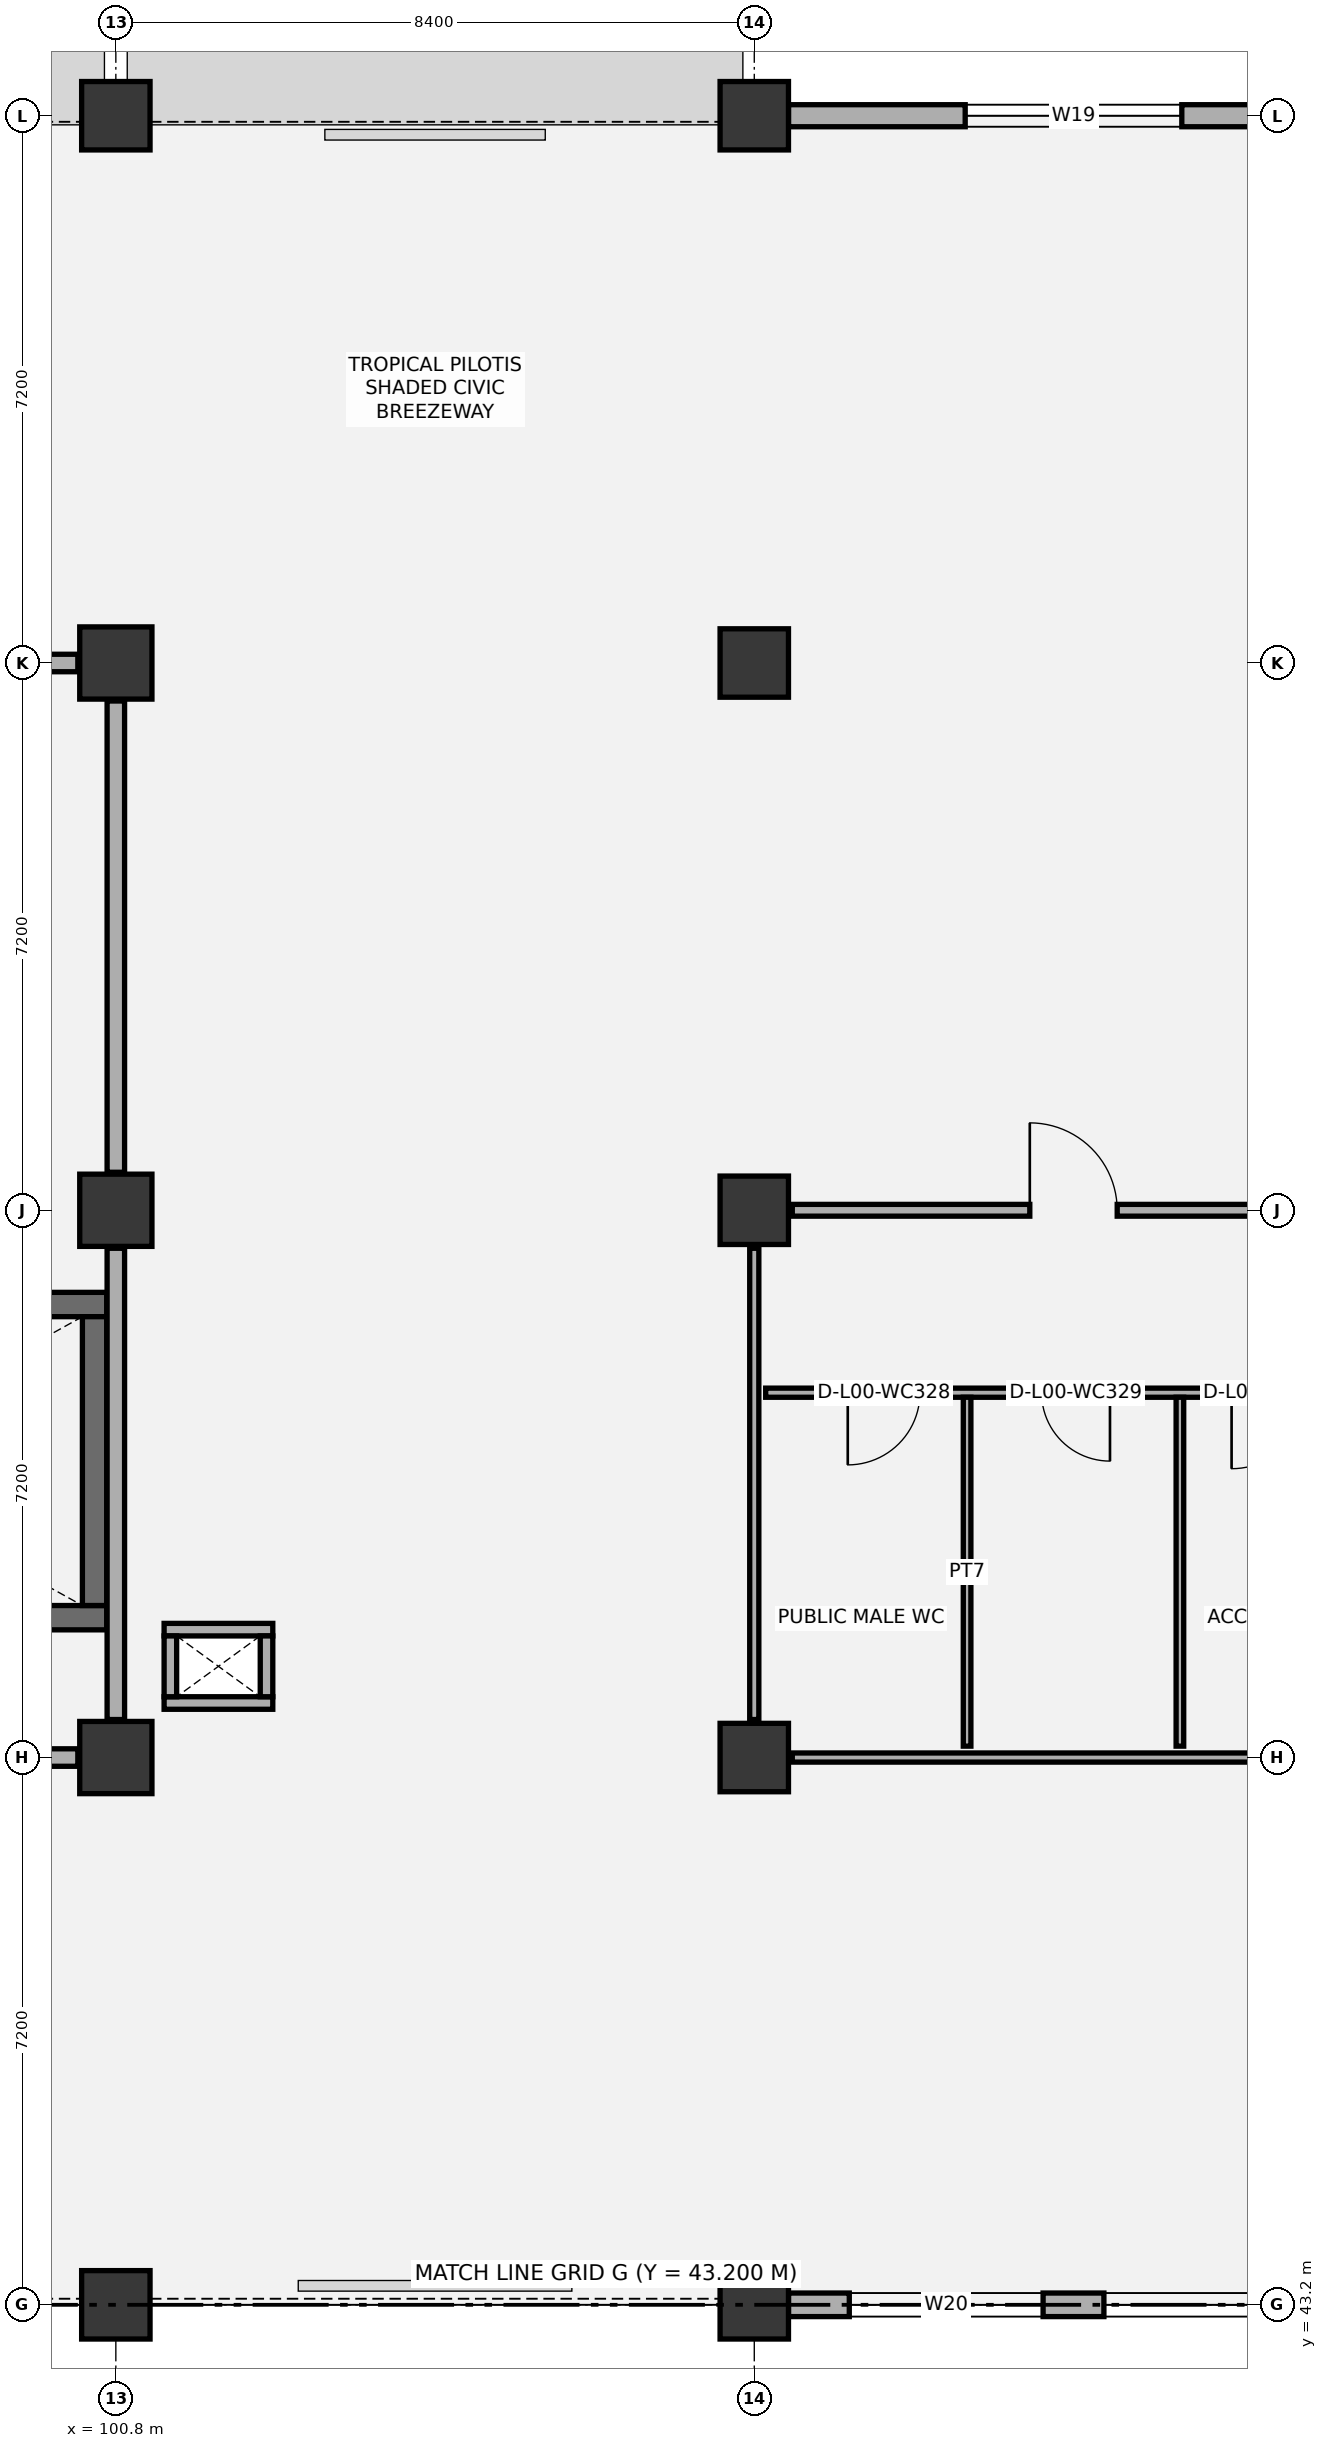
"""IFC4 building model, lengths in metres.
Left out: names, types, materials, properties, quantities, classifications, styles, units other than length and angle.
Written with IfcOpenShell. Run it as: python <this file> out.ifc"""

import sys

from ifc_helpers import new_model, si_unit, direction, frame, frame_2d, origin, origin_2d, place, context, subcontext, project, spatial, rectangle, circle, extrude, element, fill, save


model = new_model("IFC4")
c1 = context("Model", 3, precision=1e-05, world=origin(), true_north=direction((0.0, 1.0)))
c2 = subcontext(c1, "Body", "Model", "MODEL_VIEW")
j1 = project(units=[si_unit("LENGTHUNIT", "METRE"), si_unit("PLANEANGLEUNIT", "RADIAN")], contexts=[c1])
p1 = place(None, origin())
s1 = spatial("IfcSite", under=j1, at=p1, CompositionType="ELEMENT")
p2 = place(p1, origin())
s2 = spatial("IfcBuilding", under=s1, at=p2, CompositionType="ELEMENT")
p3 = place(p2, origin())
s3 = spatial("IfcBuildingStorey", under=s2, at=p3, CompositionType="ELEMENT", Elevation=0.0)
p4 = place(p3, frame((100.8, 43.2, 0.0), z_axis=(0.0, 0.0, 1.0), x_axis=(1.0, 0.0, 0.0)))
e1 = element("IfcColumn", 1, at=p4, inside=s3, PredefinedType="COLUMN", context=c2, shape_type="SweptSolid", body=[
    extrude(circle(Radius=0.45, at=origin_2d()), origin(), (0.0, 0.0, 1.0), 6.0),
])
for number, where, z_axis, x_axis in (
    (2, (100.8, 50.4, 0.0), (0.0, 0.0, 1.0), (1.0, 0.0, 0.0)),
    (3, (100.8, 57.6, 0.0), (0.0, 0.0, 1.0), (1.0, 0.0, 0.0)),
    (4, (100.8, 64.8, 0.0), (0.0, 0.0, 1.0), (1.0, 0.0, 0.0)),
):
    element("IfcColumn", number, at=place(p3, frame(where, z_axis=z_axis, x_axis=x_axis)), inside=s3, PredefinedType="COLUMN", context=c2, shape_type="SweptSolid", body=[
        extrude(rectangle(XDim=0.95, YDim=0.95, at=origin_2d()), origin(), (0.0, 0.0, 1.0), 6.0),
    ])
for number, where, z_axis, x_axis in (
    (5, (100.8, 72.0, 0.0), (0.0, 0.0, 1.0), (1.0, 0.0, 0.0)),
    (6, (109.2, 43.2, 0.0), (0.0, 0.0, 1.0), (1.0, 0.0, 0.0)),
):
    element("IfcColumn", number, at=place(p3, frame(where, z_axis=z_axis, x_axis=x_axis)), inside=s3, PredefinedType="COLUMN", context=c2, shape_type="SweptSolid", body=[
        extrude(circle(Radius=0.45, at=origin_2d()), origin(), (0.0, 0.0, 1.0), 6.0),
    ])
for number, where, z_axis, x_axis in (
    (7, (109.2, 50.4, 0.0), (0.0, 0.0, 1.0), (1.0, 0.0, 0.0)),
    (8, (109.2, 57.6, 0.0), (0.0, 0.0, 1.0), (1.0, 0.0, 0.0)),
    (9, (109.2, 64.8, 0.0), (0.0, 0.0, 1.0), (1.0, 0.0, 0.0)),
):
    element("IfcColumn", number, at=place(p3, frame(where, z_axis=z_axis, x_axis=x_axis)), inside=s3, PredefinedType="COLUMN", context=c2, shape_type="SweptSolid", body=[
        extrude(rectangle(XDim=0.9, YDim=0.9, at=origin_2d()), origin(), (0.0, 0.0, 1.0), 6.0),
    ])
p5 = place(p3, frame((109.2, 72.0, 0.0), z_axis=(0.0, 0.0, 1.0), x_axis=(1.0, 0.0, 0.0)))
e10 = element("IfcColumn", 10, at=p5, inside=s3, PredefinedType="COLUMN", context=c2, shape_type="SweptSolid", body=[
    extrude(circle(Radius=0.45, at=origin_2d()), origin(), (0.0, 0.0, 1.0), 6.0),
])
p6 = place(p3, frame((93.2, 52.24, 0.0), z_axis=(0.0, 0.0, 1.0), x_axis=(1.0, 0.0, 0.0)))
e11 = element("IfcWall", 11, at=p6, inside=s3, PredefinedType="SHEAR", context=c2, shape_type="SweptSolid", body=[
    extrude(rectangle(XDim=7.48, YDim=0.32, at=frame_2d((3.74, 0.0))), origin(), (0.0, 0.0, 1.0), 5.675),
])
p7 = place(p6, frame((0.45, 0.0, 0.0)))
e12 = element("IfcOpeningElement", 12, at=p7, cuts=e11, PredefinedType="OPENING", context=c2, shape_type="SweptSolid", body=[
    extrude(rectangle(XDim=1.05, YDim=2.15, at=frame_2d((0.525, 1.075))), frame((0.0, 0.17, 0.0), z_axis=(0.0, -1.0, 0.0), x_axis=(1.0, 0.0, 0.0)), (0.0, 0.0, 1.0), 0.34),
])
p8 = place(p3, frame((93.2, 56.36, 0.0), z_axis=(0.0, 0.0, 1.0), x_axis=(1.0, 0.0, 0.0)))
e13 = element("IfcWall", 13, at=p8, inside=s3, PredefinedType="SHEAR", context=c2, shape_type="SweptSolid", body=[
    extrude(rectangle(XDim=7.48, YDim=0.32, at=frame_2d((3.74, 0.0))), origin(), (0.0, 0.0, 1.0), 5.675),
])
p9 = place(p3, frame((100.52, 52.4, 0.0), z_axis=(0.0, 0.0, 1.0), x_axis=(0.0, 1.0, 0.0)))
e14 = element("IfcWall", 14, at=p9, inside=s3, PredefinedType="SHEAR", context=c2, shape_type="SweptSolid", body=[
    extrude(rectangle(XDim=3.8, YDim=0.32, at=frame_2d((1.9, 0.0))), origin(), (0.0, 0.0, 1.0), 5.675),
])
p10 = place(p3, frame((109.65, 43.2, 0.0), z_axis=(0.0, 0.0, 1.0), x_axis=(1.0, 0.0, 0.0)))
e15 = element("IfcWall", 15, at=p10, inside=s3, PredefinedType="SOLIDWALL", context=c2, shape_type="SweptSolid", body=[
    extrude(rectangle(XDim=7.5, YDim=0.31, at=frame_2d((3.75, 0.0))), origin(), (0.0, 0.0, 1.0), 5.02),
])
p11 = place(p10, frame((0.8, 0.0, 0.9)))
e16 = element("IfcOpeningElement", 16, at=p11, cuts=e15, PredefinedType="OPENING", context=c2, shape_type="SweptSolid", body=[
    extrude(rectangle(XDim=2.55, YDim=1.95, at=frame_2d((1.275, 0.975))), frame((0.0, 0.165, 0.0), z_axis=(0.0, -1.0, 0.0), x_axis=(1.0, 0.0, 0.0)), (0.0, 0.0, 1.0), 0.33),
])
p12 = place(p10, frame((4.15, 0.0, 0.9)))
e17 = element("IfcOpeningElement", 17, at=p12, cuts=e15, PredefinedType="OPENING", context=c2, shape_type="SweptSolid", body=[
    extrude(rectangle(XDim=2.55, YDim=1.95, at=frame_2d((1.275, 0.975))), frame((0.0, 0.165, 0.0), z_axis=(0.0, -1.0, 0.0), x_axis=(1.0, 0.0, 0.0)), (0.0, 0.0, 1.0), 0.33),
])
p13 = place(p3, frame((109.65, 72.0, 0.0), z_axis=(0.0, 0.0, 1.0), x_axis=(1.0, 0.0, 0.0)))
e18 = element("IfcWall", 18, at=p13, inside=s3, PredefinedType="SOLIDWALL", context=c2, shape_type="SweptSolid", body=[
    extrude(rectangle(XDim=7.5, YDim=0.29, at=frame_2d((3.75, 0.0))), origin(), (0.0, 0.0, 1.0), 5.02),
])
p14 = place(p13, frame((2.325, 0.0, 0.9)))
e19 = element("IfcOpeningElement", 19, at=p14, cuts=e18, PredefinedType="OPENING", context=c2, shape_type="SweptSolid", body=[
    extrude(rectangle(XDim=2.85, YDim=1.95, at=frame_2d((1.425, 0.975))), frame((0.0, 0.155, 0.0), z_axis=(0.0, -1.0, 0.0), x_axis=(1.0, 0.0, 0.0)), (0.0, 0.0, 1.0), 0.31),
])
for number, where, z_axis, x_axis in (
    (20, (101.435, 51.117, 0.0), (0.0, 0.0, 1.0), (1.0, 0.0, 0.0)),
    (21, (101.435, 52.083, 0.0), (0.0, 0.0, 1.0), (1.0, 0.0, 0.0)),
):
    element("IfcWall", number, at=place(p3, frame(where, z_axis=z_axis, x_axis=x_axis)), inside=s3, PredefinedType="PARTITIONING", context=c2, shape_type="SweptSolid", body=[
        extrude(rectangle(XDim=1.43, YDim=0.165, at=frame_2d((0.715, 0.0))), origin(), (0.0, 0.0, 1.0), 5.675),
    ])
for number, where, z_axis, x_axis in (
    (22, (101.518, 51.2, 0.0), (0.0, 0.0, 1.0), (0.0, 1.0, 0.0)),
    (23, (102.782, 51.2, 0.0), (0.0, 0.0, 1.0), (0.0, 1.0, 0.0)),
):
    element("IfcWall", number, at=place(p3, frame(where, z_axis=z_axis, x_axis=x_axis)), inside=s3, PredefinedType="PARTITIONING", context=c2, shape_type="SweptSolid", body=[
        extrude(rectangle(XDim=0.8, YDim=0.165, at=frame_2d((0.4, 0.0))), origin(), (0.0, 0.0, 1.0), 5.675),
    ])
p15 = place(p3, frame((109.35, 55.2, 0.0), z_axis=(0.0, 0.0, 1.0), x_axis=(1.0, 0.0, 0.0)))
e24 = element("IfcWall", 24, at=p15, inside=s3, PredefinedType="PARTITIONING", context=c2, shape_type="SweptSolid", body=[
    extrude(rectangle(XDim=8.1, YDim=0.12, at=frame_2d((4.05, 0.0))), origin(), (0.0, 0.0, 1.0), 5.675),
])
p16 = place(p15, frame((1.08, 0.0, 0.0)))
e25 = element("IfcOpeningElement", 25, at=p16, cuts=e24, PredefinedType="OPENING", context=c2, shape_type="SweptSolid", body=[
    extrude(rectangle(XDim=0.95, YDim=2.1, at=frame_2d((0.475, 1.05))), frame((0.0, 0.07, 0.0), z_axis=(0.0, -1.0, 0.0), x_axis=(1.0, 0.0, 0.0)), (0.0, 0.0, 1.0), 0.14),
])
p17 = place(p15, frame((3.63, 0.0, 0.0)))
e26 = element("IfcOpeningElement", 26, at=p17, cuts=e24, PredefinedType="OPENING", context=c2, shape_type="SweptSolid", body=[
    extrude(rectangle(XDim=0.9, YDim=2.1, at=frame_2d((0.45, 1.05))), frame((0.0, 0.07, 0.0), z_axis=(0.0, -1.0, 0.0), x_axis=(1.0, 0.0, 0.0)), (0.0, 0.0, 1.0), 0.14),
])
p18 = place(p15, frame((6.13, 0.0, 0.0)))
e27 = element("IfcOpeningElement", 27, at=p18, cuts=e24, PredefinedType="OPENING", context=c2, shape_type="SweptSolid", body=[
    extrude(rectangle(XDim=1.0, YDim=2.1, at=frame_2d((0.5, 1.05))), frame((0.0, 0.07, 0.0), z_axis=(0.0, -1.0, 0.0), x_axis=(1.0, 0.0, 0.0)), (0.0, 0.0, 1.0), 0.14),
])
for number, where, z_axis, x_axis in (
    (28, (112.0, 50.55, 0.0), (0.0, 0.0, 1.0), (0.0, 1.0, 0.0)),
    (29, (114.8, 50.55, 0.0), (0.0, 0.0, 1.0), (0.0, 1.0, 0.0)),
):
    element("IfcWall", number, at=place(p3, frame(where, z_axis=z_axis, x_axis=x_axis)), inside=s3, PredefinedType="PARTITIONING", context=c2, shape_type="SweptSolid", body=[
        extrude(rectangle(XDim=4.59, YDim=0.1, at=frame_2d((2.295, 0.0))), origin(), (0.0, 0.0, 1.0), 5.675),
    ])
p19 = place(p3, frame((92.9, 50.4, 0.0), z_axis=(0.0, 0.0, 1.0), x_axis=(1.0, 0.0, 0.0)))
e30 = element("IfcWall", 30, at=p19, inside=s3, PredefinedType="PARTITIONING", context=c2, shape_type="SweptSolid", body=[
    extrude(rectangle(XDim=7.4, YDim=0.23, at=frame_2d((3.7, 0.0))), origin(), (0.0, 0.0, 1.0), 4.87),
])
p20 = place(p19, frame((2.95, 0.0, 0.0)))
e31 = element("IfcOpeningElement", 31, at=p20, cuts=e30, PredefinedType="OPENING", context=c2, shape_type="SweptSolid", body=[
    extrude(rectangle(XDim=1.5, YDim=2.15, at=frame_2d((0.75, 1.075))), frame((0.0, 0.125, 0.0), z_axis=(0.0, -1.0, 0.0), x_axis=(1.0, 0.0, 0.0)), (0.0, 0.0, 1.0), 0.25),
])
p21 = place(p3, frame((100.8, 50.9, 0.0), z_axis=(0.0, 0.0, 1.0), x_axis=(0.0, 1.0, 0.0)))
e32 = element("IfcWall", 32, at=p21, inside=s3, PredefinedType="PARTITIONING", context=c2, shape_type="SweptSolid", body=[
    extrude(rectangle(XDim=6.2, YDim=0.23, at=frame_2d((3.1, 0.0))), origin(), (0.0, 0.0, 1.0), 4.92),
])
p22 = place(p3, frame((100.8, 58.1, 0.0), z_axis=(0.0, 0.0, 1.0), x_axis=(0.0, 1.0, 0.0)))
e33 = element("IfcWall", 33, at=p22, inside=s3, PredefinedType="PARTITIONING", context=c2, shape_type="SweptSolid", body=[
    extrude(rectangle(XDim=6.2, YDim=0.23, at=frame_2d((3.1, 0.0))), origin(), (0.0, 0.0, 1.0), 5.38),
])
p23 = place(p3, frame((92.9, 64.8, 0.0), z_axis=(0.0, 0.0, 1.0), x_axis=(1.0, 0.0, 0.0)))
e34 = element("IfcWall", 34, at=p23, inside=s3, PredefinedType="PARTITIONING", context=c2, shape_type="SweptSolid", body=[
    extrude(rectangle(XDim=7.4, YDim=0.23, at=frame_2d((3.7, 0.0))), origin(), (0.0, 0.0, 1.0), 4.87),
])
p24 = place(p3, frame((109.2, 50.9, 0.0), z_axis=(0.0, 0.0, 1.0), x_axis=(0.0, 1.0, 0.0)))
e35 = element("IfcWall", 35, at=p24, inside=s3, PredefinedType="PARTITIONING", context=c2, shape_type="SweptSolid", body=[
    extrude(rectangle(XDim=6.2, YDim=0.12, at=frame_2d((3.1, 0.0))), origin(), (0.0, 0.0, 1.0), 5.38),
])
p25 = place(p3, frame((109.7, 50.4, 0.0), z_axis=(0.0, 0.0, 1.0), x_axis=(1.0, 0.0, 0.0)))
e36 = element("IfcWall", 36, at=p25, inside=s3, PredefinedType="PARTITIONING", context=c2, shape_type="SweptSolid", body=[
    extrude(rectangle(XDim=7.4, YDim=0.12, at=frame_2d((3.7, 0.0))), origin(), (0.0, 0.0, 1.0), 4.87),
])
p26 = place(p3, frame((109.7, 57.6, 0.0), z_axis=(0.0, 0.0, 1.0), x_axis=(1.0, 0.0, 0.0)))
e37 = element("IfcWall", 37, at=p26, inside=s3, PredefinedType="PARTITIONING", context=c2, shape_type="SweptSolid", body=[
    extrude(rectangle(XDim=7.4, YDim=0.155, at=frame_2d((3.7, 0.0))), origin(), (0.0, 0.0, 1.0), 4.87),
])
p27 = place(p26, frame((3.125, 0.0, 0.0)))
e38 = element("IfcOpeningElement", 38, at=p27, cuts=e37, PredefinedType="OPENING", context=c2, shape_type="SweptSolid", body=[
    extrude(rectangle(XDim=1.15, YDim=2.1, at=frame_2d((0.575, 1.05))), frame((0.0, 0.087, 0.0), z_axis=(0.0, -1.0, 0.0), x_axis=(1.0, 0.0, 0.0)), (0.0, 0.0, 1.0), 0.175),
])
p28 = place(p11, origin())
e39 = element("IfcWindow", 39, at=p28, inside=s3, PartitioningType="SINGLE_PANEL", PredefinedType="WINDOW", context=c2, shape_type="SweptSolid", body=[
    extrude(rectangle(XDim=2.55, YDim=1.95, at=frame_2d((1.275, 0.975))), frame((0.0, 0.03, 0.0), z_axis=(0.0, -1.0, 0.0), x_axis=(1.0, 0.0, 0.0)), (0.0, 0.0, 1.0), 0.06),
])
fill(e16, e39)
p29 = place(p12, origin())
e40 = element("IfcWindow", 40, at=p29, inside=s3, PartitioningType="SINGLE_PANEL", PredefinedType="WINDOW", context=c2, shape_type="SweptSolid", body=[
    extrude(rectangle(XDim=2.55, YDim=1.95, at=frame_2d((1.275, 0.975))), frame((0.0, 0.03, 0.0), z_axis=(0.0, -1.0, 0.0), x_axis=(1.0, 0.0, 0.0)), (0.0, 0.0, 1.0), 0.06),
])
fill(e17, e40)
p30 = place(p14, origin())
e41 = element("IfcWindow", 41, at=p30, inside=s3, PartitioningType="SINGLE_PANEL", PredefinedType="WINDOW", context=c2, shape_type="SweptSolid", body=[
    extrude(rectangle(XDim=2.85, YDim=1.95, at=frame_2d((1.425, 0.975))), frame((0.0, 0.03, 0.0), z_axis=(0.0, -1.0, 0.0), x_axis=(1.0, 0.0, 0.0)), (0.0, 0.0, 1.0), 0.06),
])
fill(e19, e41)
p31 = place(p16, frame((0.95, 0.0, 0.0), z_axis=(0.0, 0.0, 1.0), x_axis=(-1.0, 0.0, 0.0)))
e42 = element("IfcDoor", 42, at=p31, inside=s3, OperationType="SINGLE_SWING_RIGHT", PredefinedType="DOOR", context=c2, shape_type="SweptSolid", body=[
    extrude(rectangle(XDim=0.95, YDim=2.1, at=frame_2d((0.475, 1.05))), frame((0.0, 0.025, 0.0), z_axis=(0.0, -1.0, 0.0), x_axis=(1.0, 0.0, 0.0)), (0.0, 0.0, 1.0), 0.05),
])
fill(e25, e42)
p32 = place(p17, frame((0.9, 0.0, 0.0), z_axis=(0.0, 0.0, 1.0), x_axis=(-1.0, 0.0, 0.0)))
e43 = element("IfcDoor", 43, at=p32, inside=s3, OperationType="SINGLE_SWING_LEFT", PredefinedType="DOOR", context=c2, shape_type="SweptSolid", body=[
    extrude(rectangle(XDim=0.9, YDim=2.1, at=frame_2d((0.45, 1.05))), frame((0.0, 0.025, 0.0), z_axis=(0.0, -1.0, 0.0), x_axis=(1.0, 0.0, 0.0)), (0.0, 0.0, 1.0), 0.05),
])
fill(e26, e43)
p33 = place(p18, frame((1.0, 0.0, 0.0), z_axis=(0.0, 0.0, 1.0), x_axis=(-1.0, 0.0, 0.0)))
e44 = element("IfcDoor", 44, at=p33, inside=s3, OperationType="SINGLE_SWING_RIGHT", PredefinedType="DOOR", context=c2, shape_type="SweptSolid", body=[
    extrude(rectangle(XDim=1.0, YDim=2.1, at=frame_2d((0.5, 1.05))), frame((0.0, 0.025, 0.0), z_axis=(0.0, -1.0, 0.0), x_axis=(1.0, 0.0, 0.0)), (0.0, 0.0, 1.0), 0.05),
])
fill(e27, e44)
p34 = place(p27, origin())
e45 = element("IfcDoor", 45, at=p34, inside=s3, OperationType="SINGLE_SWING_LEFT", PredefinedType="DOOR", context=c2, shape_type="SweptSolid", body=[
    extrude(rectangle(XDim=1.15, YDim=2.1, at=frame_2d((0.575, 1.05))), frame((0.0, 0.025, 0.0), z_axis=(0.0, -1.0, 0.0), x_axis=(1.0, 0.0, 0.0)), (0.0, 0.0, 1.0), 0.05),
])
fill(e38, e45)
save(model, sys.argv[1])
